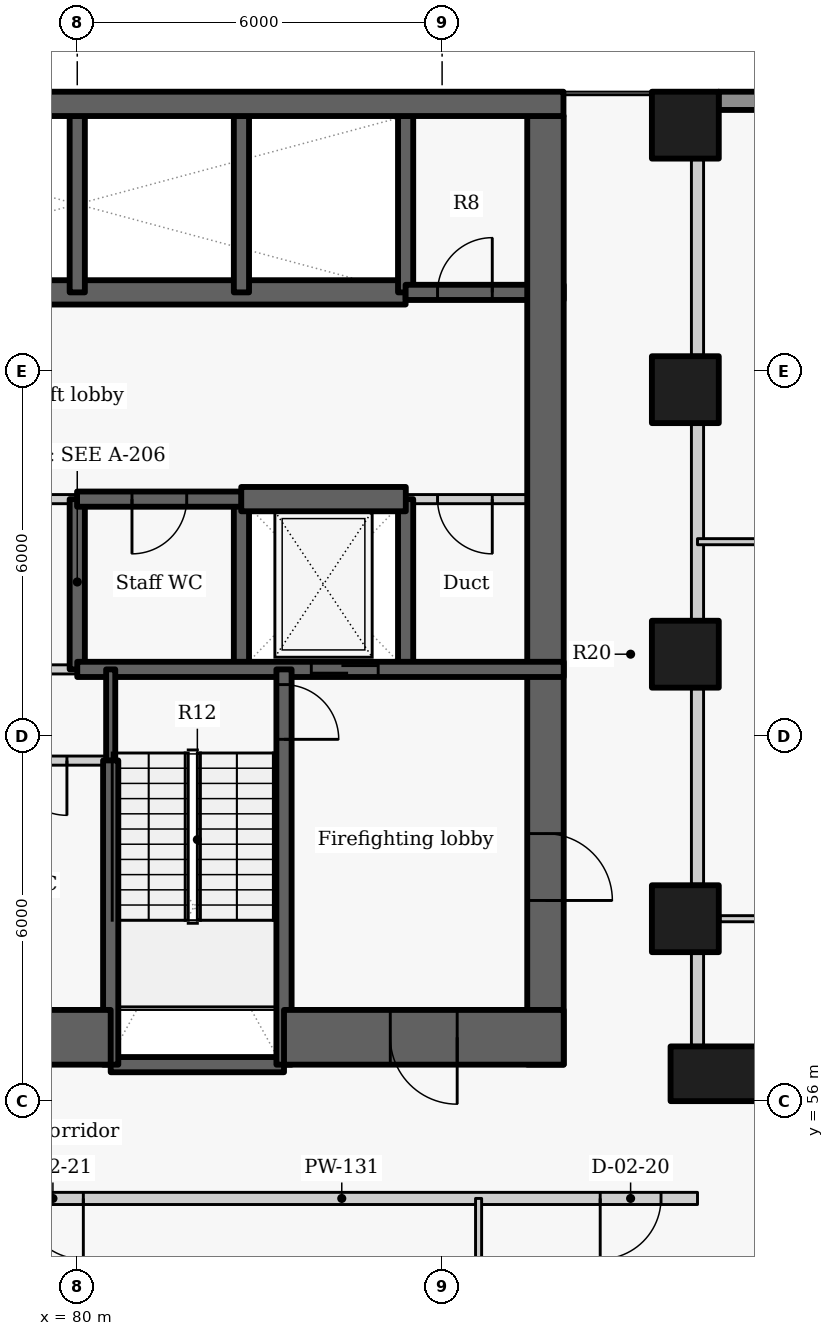
"""IFC4 building model, lengths in metres.
Left out: names, types, materials, properties, quantities, classifications, styles, units other than length and angle.
Written with IfcOpenShell. Run it as: python <this file> out.ifc"""

import sys

from ifc_helpers import new_model, si_unit, direction, frame, frame_2d, origin, origin_2d, place, context, subcontext, project, spatial, rectangle, extrude, element, fill, save


model = new_model("IFC4")
c1 = context("Model", 3, precision=1e-05, world=origin(), true_north=direction((0.0, 1.0)))
c2 = subcontext(c1, "Body", "Model", "MODEL_VIEW")
j1 = project(units=[si_unit("LENGTHUNIT", "METRE"), si_unit("PLANEANGLEUNIT", "RADIAN")], contexts=[c1])
p1 = place(None, origin())
s1 = spatial("IfcSite", under=j1, at=p1, CompositionType="ELEMENT")
p2 = place(p1, origin())
s2 = spatial("IfcBuilding", under=s1, at=p2, CompositionType="ELEMENT")
p3 = place(p2, frame((0.0, 0.0, 24.0)))
s3 = spatial("IfcBuildingStorey", under=s2, at=p3, CompositionType="ELEMENT", Elevation=24.0)
p4 = place(p3, frame((90.507, 56.45, 0.0), z_axis=(0.0, 0.0, 1.0), x_axis=(1.0, 0.0, 0.0)))
e1 = element("IfcColumn", 1, at=p4, inside=s3, PredefinedType="COLUMN", context=c2, shape_type="SweptSolid", body=[
    extrude(rectangle(XDim=1.5, YDim=0.9, at=origin_2d()), origin(), (0.0, 0.0, 1.0), 4.2),
])
for number, where, z_axis, x_axis in (
    (2, (90.0, 59.0, 0.0), (0.0, 0.0, 1.0), (0.0, 1.0, 0.0)),
    (3, (90.0, 63.35, 0.0), (0.0, 0.0, 1.0), (0.0, 1.0, 0.0)),
    (4, (90.0, 67.7, 0.0), (0.0, 0.0, 1.0), (0.0, 1.0, 0.0)),
    (5, (90.0, 72.05, 0.0), (0.0, 0.0, 1.0), (0.0, 1.0, 0.0)),
):
    element("IfcColumn", number, at=place(p3, frame(where, z_axis=z_axis, x_axis=x_axis)), inside=s3, PredefinedType="COLUMN", context=c2, shape_type="SweptSolid", body=[
        extrude(rectangle(XDim=1.1, YDim=1.1, at=origin_2d()), origin(), (0.0, 0.0, 1.0), 4.2),
    ])
p5 = place(p3, frame((96.562, 72.45, 0.0), z_axis=(0.0, 0.0, 1.0), x_axis=(-1.0, 0.0, 0.0)))
e6 = element("IfcWall", 6, at=p5, inside=s3, PredefinedType="SOLIDWALL", context=c2, shape_type="SweptSolid", body=[
    extrude(rectangle(XDim=6.016, YDim=0.3, at=frame_2d((3.008, 0.0))), origin(), (0.0, 0.0, 1.0), 3.325),
])
p6 = place(p5, frame((1.958, 0.0, 0.9)))
e7 = element("IfcOpeningElement", 7, at=p6, cuts=e6, PredefinedType="OPENING", context=c2, shape_type="SweptSolid", body=[
    extrude(rectangle(XDim=2.1, YDim=2.05, at=frame_2d((1.05, 1.025))), frame((0.0, 0.16, 0.0), z_axis=(0.0, -1.0, 0.0), x_axis=(1.0, 0.0, 0.0)), (0.0, 0.0, 1.0), 0.32),
])
p7 = place(p3, frame((74.6, 69.3, -0.3), z_axis=(0.0, 0.0, 1.0), x_axis=(1.0, 0.0, 0.0)))
e8 = element("IfcWall", 8, at=p7, inside=s3, PredefinedType="SHEAR", context=c2, shape_type="SweptSolid", body=[
    extrude(rectangle(XDim=10.8, YDim=0.4, at=frame_2d((5.4, 0.0))), origin(), (0.0, 0.0, 1.0), 4.225),
])
p8 = place(p3, frame((80.0, 63.1, -0.3), z_axis=(0.0, 0.0, 1.0), x_axis=(0.0, 1.0, 0.0)))
e9 = element("IfcWall", 9, at=p8, inside=s3, PredefinedType="SHEAR", context=c2, shape_type="SweptSolid", body=[
    extrude(rectangle(XDim=2.8, YDim=0.25, at=frame_2d((1.4, 0.0))), origin(), (0.0, 0.0, 1.0), 4.225),
])
p9 = place(p3, frame((80.0, 69.3, -0.3), z_axis=(0.0, 0.0, 1.0), x_axis=(0.0, 1.0, 0.0)))
e10 = element("IfcWall", 10, at=p9, inside=s3, PredefinedType="SHEAR", context=c2, shape_type="SweptSolid", body=[
    extrude(rectangle(XDim=2.9, YDim=0.25, at=frame_2d((1.45, 0.0))), origin(), (0.0, 0.0, 1.0), 4.225),
])
p10 = place(p3, frame((82.7, 63.1, -0.3), z_axis=(0.0, 0.0, 1.0), x_axis=(0.0, 1.0, 0.0)))
e11 = element("IfcWall", 11, at=p10, inside=s3, PredefinedType="SHEAR", context=c2, shape_type="SweptSolid", body=[
    extrude(rectangle(XDim=2.8, YDim=0.25, at=frame_2d((1.4, 0.0))), origin(), (0.0, 0.0, 1.0), 4.225),
])
p11 = place(p3, frame((82.7, 69.3, -0.3), z_axis=(0.0, 0.0, 1.0), x_axis=(0.0, 1.0, 0.0)))
e12 = element("IfcWall", 12, at=p11, inside=s3, PredefinedType="SHEAR", context=c2, shape_type="SweptSolid", body=[
    extrude(rectangle(XDim=2.9, YDim=0.25, at=frame_2d((1.45, 0.0))), origin(), (0.0, 0.0, 1.0), 4.225),
])
p12 = place(p3, frame((85.4, 63.1, -0.3), z_axis=(0.0, 0.0, 1.0), x_axis=(0.0, 1.0, 0.0)))
e13 = element("IfcWall", 13, at=p12, inside=s3, PredefinedType="SHEAR", context=c2, shape_type="SweptSolid", body=[
    extrude(rectangle(XDim=2.8, YDim=0.25, at=frame_2d((1.4, 0.0))), origin(), (0.0, 0.0, 1.0), 4.225),
])
p13 = place(p3, frame((85.4, 69.3, -0.3), z_axis=(0.0, 0.0, 1.0), x_axis=(0.0, 1.0, 0.0)))
e14 = element("IfcWall", 14, at=p13, inside=s3, PredefinedType="SHEAR", context=c2, shape_type="SweptSolid", body=[
    extrude(rectangle(XDim=2.9, YDim=0.25, at=frame_2d((1.45, 0.0))), origin(), (0.0, 0.0, 1.0), 4.225),
])
p14 = place(p3, frame((85.4, 69.3, -0.3), z_axis=(0.0, 0.0, 1.0), x_axis=(1.0, 0.0, 0.0)))
e15 = element("IfcWall", 15, at=p14, inside=s3, PredefinedType="SHEAR", context=c2, shape_type="SweptSolid", body=[
    extrude(rectangle(XDim=2.6, YDim=0.25, at=frame_2d((1.3, 0.0))), origin(), (0.0, 0.0, 1.0), 4.225),
])
p15 = place(p14, frame((0.525, 0.0, 0.3)))
e16 = element("IfcOpeningElement", 16, at=p15, cuts=e15, PredefinedType="OPENING", context=c2, shape_type="SweptSolid", body=[
    extrude(rectangle(XDim=0.9, YDim=2.1, at=frame_2d((0.45, 1.05))), frame((0.0, 0.135, 0.0), z_axis=(0.0, -1.0, 0.0), x_axis=(1.0, 0.0, 0.0)), (0.0, 0.0, 1.0), 0.27),
])
p16 = place(p3, frame((87.7, 72.2, -0.3), z_axis=(0.0, 0.0, 1.0), x_axis=(0.0, -1.0, 0.0)))
e17 = element("IfcWall", 17, at=p16, inside=s3, PredefinedType="SHEAR", context=c2, shape_type="SweptSolid", body=[
    extrude(rectangle(XDim=15.6, YDim=0.6, at=frame_2d((7.8, 0.0))), origin(), (0.0, 0.0, 1.0), 4.225),
])
p17 = place(p16, frame((11.8, 0.0, 0.3)))
e18 = element("IfcOpeningElement", 18, at=p17, cuts=e17, PredefinedType="OPENING", context=c2, shape_type="SweptSolid", body=[
    extrude(rectangle(XDim=1.1, YDim=2.1, at=frame_2d((0.55, 1.05))), frame((0.0, 0.31, 0.0), z_axis=(0.0, -1.0, 0.0), x_axis=(1.0, 0.0, 0.0)), (0.0, 0.0, 1.0), 0.62),
])
p18 = place(p3, frame((80.003, 65.9, 0.0), z_axis=(0.0, 0.0, 1.0), x_axis=(-1.0, 0.0, 0.0)))
e19 = element("IfcWall", 19, at=p18, inside=s3, PredefinedType="PARTITIONING", context=c2, shape_type="SweptSolid", body=[
    extrude(rectangle(XDim=2.706, YDim=0.15, at=frame_2d((1.353, 0.0))), origin(), (0.0, 0.0, 1.0), 3.925),
])
p19 = place(p18, frame((0.753, 0.0, 0.0)))
e20 = element("IfcOpeningElement", 20, at=p19, cuts=e19, PredefinedType="OPENING", context=c2, shape_type="SweptSolid", body=[
    extrude(rectangle(XDim=1.2, YDim=2.1, at=frame_2d((0.6, 1.05))), frame((0.0, 0.085, 0.0), z_axis=(0.0, -1.0, 0.0), x_axis=(1.0, 0.0, 0.0)), (0.0, 0.0, 1.0), 0.17),
])
p20 = place(p3, frame((88.0, 65.9, 0.0), z_axis=(0.0, 0.0, 1.0), x_axis=(-1.0, 0.0, 0.0)))
e21 = element("IfcWall", 21, at=p20, inside=s3, PredefinedType="PARTITIONING", context=c2, shape_type="SweptSolid", body=[
    extrude(rectangle(XDim=2.603, YDim=0.15, at=frame_2d((1.302, 0.0))), origin(), (0.0, 0.0, 1.0), 3.925),
])
p21 = place(p20, frame((1.175, 0.0, 0.0)))
e22 = element("IfcOpeningElement", 22, at=p21, cuts=e21, PredefinedType="OPENING", context=c2, shape_type="SweptSolid", body=[
    extrude(rectangle(XDim=0.9, YDim=2.1, at=frame_2d((0.45, 1.05))), frame((0.0, 0.085, 0.0), z_axis=(0.0, -1.0, 0.0), x_axis=(1.0, 0.0, 0.0)), (0.0, 0.0, 1.0), 0.17),
])
p22 = place(p3, frame((82.703, 65.9, -0.3), z_axis=(0.0, 0.0, 1.0), x_axis=(-1.0, 0.0, 0.0)))
e23 = element("IfcWall", 23, at=p22, inside=s3, PredefinedType="SHEAR", context=c2, shape_type="SweptSolid", body=[
    extrude(rectangle(XDim=2.706, YDim=0.25, at=frame_2d((1.353, 0.0))), origin(), (0.0, 0.0, 1.0), 4.225),
])
p23 = place(p22, frame((0.903, 0.0, 0.3)))
e24 = element("IfcOpeningElement", 24, at=p23, cuts=e23, PredefinedType="OPENING", context=c2, shape_type="SweptSolid", body=[
    extrude(rectangle(XDim=0.9, YDim=2.1, at=frame_2d((0.45, 1.05))), frame((0.0, 0.135, 0.0), z_axis=(0.0, -1.0, 0.0), x_axis=(1.0, 0.0, 0.0)), (0.0, 0.0, 1.0), 0.27),
])
p24 = place(p3, frame((82.697, 65.9, -0.3), z_axis=(0.0, 0.0, 1.0), x_axis=(1.0, 0.0, 0.0)))
e25 = element("IfcWall", 25, at=p24, inside=s3, PredefinedType="SHEAR", context=c2, shape_type="SweptSolid", body=[
    extrude(rectangle(XDim=2.706, YDim=0.4, at=frame_2d((1.353, 0.0))), origin(), (0.0, 0.0, 1.0), 4.225),
])
p25 = place(p3, frame((80.0, 63.1, -0.3), z_axis=(0.0, 0.0, 1.0), x_axis=(1.0, 0.0, 0.0)))
e26 = element("IfcWall", 26, at=p25, inside=s3, PredefinedType="SHEAR", context=c2, shape_type="SweptSolid", body=[
    extrude(rectangle(XDim=8.0, YDim=0.25, at=frame_2d((4.0, 0.0))), origin(), (0.0, 0.0, 1.0), 4.225),
])
p26 = place(p25, frame((3.849, 0.0, 0.3)))
e27 = element("IfcOpeningElement", 27, at=p26, cuts=e26, PredefinedType="OPENING", context=c2, shape_type="SweptSolid", body=[
    extrude(rectangle(XDim=1.1, YDim=2.1, at=frame_2d((0.55, 1.05))), frame((0.0, 0.135, 0.0), z_axis=(0.0, -1.0, 0.0), x_axis=(1.0, 0.0, 0.0)), (0.0, 0.0, 1.0), 0.27),
])
p27 = place(p3, frame((80.0, 63.1, 0.0), z_axis=(0.0, 0.0, 1.0), x_axis=(-1.0, 0.0, 0.0)))
e28 = element("IfcWall", 28, at=p27, inside=s3, PredefinedType="PARTITIONING", context=c2, shape_type="SweptSolid", body=[
    extrude(rectangle(XDim=2.7, YDim=0.15, at=frame_2d((1.35, 0.0))), origin(), (0.0, 0.0, 1.0), 3.925),
])
p28 = place(p27, frame((0.85, 0.0, 0.0)))
e29 = element("IfcOpeningElement", 29, at=p28, cuts=e28, PredefinedType="OPENING", context=c2, shape_type="SweptSolid", body=[
    extrude(rectangle(XDim=1.0, YDim=2.1, at=frame_2d((0.5, 1.05))), frame((0.0, 0.085, 0.0), z_axis=(0.0, -1.0, 0.0), x_axis=(1.0, 0.0, 0.0)), (0.0, 0.0, 1.0), 0.17),
])
p29 = place(p3, frame((80.55, 56.6, -0.3), z_axis=(0.0, 0.0, 1.0), x_axis=(1.0, 0.0, 0.0)))
e30 = element("IfcWall", 30, at=p29, inside=s3, PredefinedType="SHEAR", context=c2, shape_type="SweptSolid", body=[
    extrude(rectangle(XDim=2.85, YDim=0.25, at=frame_2d((1.425, 0.0))), origin(), (0.0, 0.0, 1.0), 4.225),
])
p30 = place(p3, frame((83.4, 63.1, -0.3), z_axis=(0.0, 0.0, 1.0), x_axis=(0.0, -1.0, 0.0)))
e31 = element("IfcWall", 31, at=p30, inside=s3, PredefinedType="SHEAR", context=c2, shape_type="SweptSolid", body=[
    extrude(rectangle(XDim=6.5, YDim=0.25, at=frame_2d((3.25, 0.0))), origin(), (0.0, 0.0, 1.0), 4.225),
])
p31 = place(p30, frame((0.25, 0.0, 0.3)))
e32 = element("IfcOpeningElement", 32, at=p31, cuts=e31, PredefinedType="OPENING", context=c2, shape_type="SweptSolid", body=[
    extrude(rectangle(XDim=0.9, YDim=2.1, at=frame_2d((0.45, 1.05))), frame((0.0, 0.135, 0.0), z_axis=(0.0, -1.0, 0.0), x_axis=(1.0, 0.0, 0.0)), (0.0, 0.0, 1.0), 0.27),
])
p32 = place(p3, frame((80.55, 61.597, -0.3), z_axis=(0.0, 0.0, 1.0), x_axis=(0.0, 1.0, 0.0)))
e33 = element("IfcWall", 33, at=p32, inside=s3, PredefinedType="SHEAR", context=c2, shape_type="SweptSolid", body=[
    extrude(rectangle(XDim=1.503, YDim=0.15, at=frame_2d((0.751, 0.0))), origin(), (0.0, 0.0, 1.0), 4.225),
])
p33 = place(p3, frame((80.55, 56.6, -0.3), z_axis=(0.0, 0.0, 1.0), x_axis=(0.0, 1.0, 0.0)))
e34 = element("IfcWall", 34, at=p33, inside=s3, PredefinedType="SHEAR", context=c2, shape_type="SweptSolid", body=[
    extrude(rectangle(XDim=5.003, YDim=0.25, at=frame_2d((2.501, 0.0))), origin(), (0.0, 0.0, 1.0), 4.225),
])
p34 = place(p3, frame((75.35, 57.05, -0.3), z_axis=(0.0, 0.0, 1.0), x_axis=(1.0, 0.0, 0.0)))
e35 = element("IfcWall", 35, at=p34, inside=s3, PredefinedType="SHEAR", context=c2, shape_type="SweptSolid", body=[
    extrude(rectangle(XDim=5.2, YDim=0.9, at=frame_2d((2.6, 0.0))), origin(), (0.0, 0.0, 1.0), 4.225),
])
p35 = place(p3, frame((88.0, 57.05, -0.3), z_axis=(0.0, 0.0, 1.0), x_axis=(-1.0, 0.0, 0.0)))
e36 = element("IfcWall", 36, at=p35, inside=s3, PredefinedType="SHEAR", context=c2, shape_type="SweptSolid", body=[
    extrude(rectangle(XDim=4.6, YDim=0.9, at=frame_2d((2.3, 0.0))), origin(), (0.0, 0.0, 1.0), 4.225),
])
p36 = place(p35, frame((1.752, 0.0, 0.3)))
e37 = element("IfcOpeningElement", 37, at=p36, cuts=e36, PredefinedType="OPENING", context=c2, shape_type="SweptSolid", body=[
    extrude(rectangle(XDim=1.1, YDim=2.1, at=frame_2d((0.55, 1.05))), frame((0.0, 0.46, 0.0), z_axis=(0.0, -1.0, 0.0), x_axis=(1.0, 0.0, 0.0)), (0.0, 0.0, 1.0), 0.92),
])
p37 = place(p3, frame((80.55, 61.6, 0.0), z_axis=(0.0, 0.0, 1.0), x_axis=(-1.0, 0.0, 0.0)))
e38 = element("IfcWall", 38, at=p37, inside=s3, PredefinedType="PARTITIONING", context=c2, shape_type="SweptSolid", body=[
    extrude(rectangle(XDim=5.2, YDim=0.15, at=frame_2d((2.6, 0.0))), origin(), (0.0, 0.0, 1.0), 3.925),
])
p38 = place(p37, frame((4.1, 0.0, 0.0)))
e39 = element("IfcOpeningElement", 39, at=p38, cuts=e38, PredefinedType="OPENING", context=c2, shape_type="SweptSolid", body=[
    extrude(rectangle(XDim=0.9, YDim=2.1, at=frame_2d((0.45, 1.05))), frame((0.0, 0.085, 0.0), z_axis=(0.0, -1.0, 0.0), x_axis=(1.0, 0.0, 0.0)), (0.0, 0.0, 1.0), 0.17),
])
p39 = place(p37, frame((2.67, 0.0, 0.0)))
e40 = element("IfcOpeningElement", 40, at=p39, cuts=e38, PredefinedType="OPENING", context=c2, shape_type="SweptSolid", body=[
    extrude(rectangle(XDim=0.9, YDim=2.1, at=frame_2d((0.45, 1.05))), frame((0.0, 0.085, 0.0), z_axis=(0.0, -1.0, 0.0), x_axis=(1.0, 0.0, 0.0)), (0.0, 0.0, 1.0), 0.17),
])
p40 = place(p37, frame((0.72, 0.0, 0.0)))
e41 = element("IfcOpeningElement", 41, at=p40, cuts=e38, PredefinedType="OPENING", context=c2, shape_type="SweptSolid", body=[
    extrude(rectangle(XDim=0.9, YDim=2.1, at=frame_2d((0.45, 1.05))), frame((0.0, 0.085, 0.0), z_axis=(0.0, -1.0, 0.0), x_axis=(1.0, 0.0, 0.0)), (0.0, 0.0, 1.0), 0.17),
])
p41 = place(p3, frame((90.2, 56.917, 0.0), z_axis=(0.0, 0.0, 1.0), x_axis=(0.0, 1.0, 0.0)))
e42 = element("IfcWall", 42, at=p41, inside=s3, PredefinedType="PARTITIONING", context=c2, shape_type="SweptSolid", body=[
    extrude(rectangle(XDim=1.516, YDim=0.2, at=frame_2d((0.758, 0.0))), origin(), (0.0, 0.0, 1.0), 3.925),
])
for number, where, z_axis, x_axis in (
    (43, (90.2, 59.567, 0.0), (0.0, 0.0, 1.0), (0.0, 1.0, 0.0)),
    (44, (90.2, 63.917, 0.0), (0.0, 0.0, 1.0), (0.0, 1.0, 0.0)),
):
    element("IfcWall", number, at=place(p3, frame(where, z_axis=z_axis, x_axis=x_axis)), inside=s3, PredefinedType="PARTITIONING", context=c2, shape_type="SweptSolid", body=[
        extrude(rectangle(XDim=3.216, YDim=0.2, at=frame_2d((1.608, 0.0))), origin(), (0.0, 0.0, 1.0), 3.405),
    ])
p42 = place(p3, frame((90.2, 68.267, 0.0), z_axis=(0.0, 0.0, 1.0), x_axis=(0.0, 1.0, 0.0)))
e45 = element("IfcWall", 45, at=p42, inside=s3, PredefinedType="PARTITIONING", context=c2, shape_type="SweptSolid", body=[
    extrude(rectangle(XDim=3.216, YDim=0.2, at=frame_2d((1.608, 0.0))), origin(), (0.0, 0.0, 1.0), 3.405),
])
p43 = place(p3, frame((90.2, 54.4, 0.0), z_axis=(0.0, 0.0, 1.0), x_axis=(-1.0, 0.0, 0.0)))
e46 = element("IfcWall", 46, at=p43, inside=s3, PredefinedType="PARTITIONING", context=c2, shape_type="SweptSolid", body=[
    extrude(rectangle(XDim=20.4, YDim=0.2, at=frame_2d((10.2, 0.0))), origin(), (0.0, 0.0, 1.0), 3.925),
])
p44 = place(p43, frame((18.8, 0.0, 0.0)))
e47 = element("IfcOpeningElement", 47, at=p44, cuts=e46, PredefinedType="OPENING", context=c2, shape_type="SweptSolid", body=[
    extrude(rectangle(XDim=1.0, YDim=2.1, at=frame_2d((0.5, 1.05))), frame((0.0, 0.11, 0.0), z_axis=(0.0, -1.0, 0.0), x_axis=(1.0, 0.0, 0.0)), (0.0, 0.0, 1.0), 0.22),
])
p45 = place(p43, frame((0.6, 0.0, 0.0)))
e48 = element("IfcOpeningElement", 48, at=p45, cuts=e46, PredefinedType="OPENING", context=c2, shape_type="SweptSolid", body=[
    extrude(rectangle(XDim=1.0, YDim=2.1, at=frame_2d((0.5, 1.05))), frame((0.0, 0.11, 0.0), z_axis=(0.0, -1.0, 0.0), x_axis=(1.0, 0.0, 0.0)), (0.0, 0.0, 1.0), 0.22),
])
p46 = place(p43, frame((10.1, 0.0, 0.0)))
e49 = element("IfcOpeningElement", 49, at=p46, cuts=e46, PredefinedType="OPENING", context=c2, shape_type="SweptSolid", body=[
    extrude(rectangle(XDim=1.0, YDim=2.1, at=frame_2d((0.5, 1.05))), frame((0.0, 0.11, 0.0), z_axis=(0.0, -1.0, 0.0), x_axis=(1.0, 0.0, 0.0)), (0.0, 0.0, 1.0), 0.22),
])
p47 = place(p3, frame((90.2, 65.2, 0.0), z_axis=(0.0, 0.0, 1.0), x_axis=(1.0, 0.0, 0.0)))
e50 = element("IfcWall", 50, at=p47, inside=s3, PredefinedType="PARTITIONING", context=c2, shape_type="SweptSolid", body=[
    extrude(rectangle(XDim=7.366, YDim=0.1, at=frame_2d((3.683, 0.0))), origin(), (0.0, 0.0, 1.0), 3.925),
])
p48 = place(p3, frame((90.57, 59.0, 0.0), z_axis=(0.0, 0.0, 1.0), x_axis=(1.0, 0.0, 0.0)))
e51 = element("IfcWall", 51, at=p48, inside=s3, PredefinedType="PARTITIONING", context=c2, shape_type="SweptSolid", body=[
    extrude(rectangle(XDim=3.956, YDim=0.1, at=frame_2d((1.978, 0.0))), origin(), (0.0, 0.0, 1.0), 3.925),
])
p49 = place(p3, frame((86.6, 47.3, 0.0), z_axis=(0.0, 0.0, 1.0), x_axis=(0.0, 1.0, 0.0)))
e52 = element("IfcWall", 52, at=p49, inside=s3, PredefinedType="PARTITIONING", context=c2, shape_type="SweptSolid", body=[
    extrude(rectangle(XDim=7.1, YDim=0.1, at=frame_2d((3.55, 0.0))), origin(), (0.0, 0.0, 1.0), 3.925),
])
p50 = place(p3, frame((72.004, 72.4, -0.3), z_axis=(0.0, 0.0, 1.0), x_axis=(1.0, 0.0, 0.0)))
e53 = element("IfcWall", 53, at=p50, inside=s3, PredefinedType="SHEAR", context=c2, shape_type="SweptSolid", body=[
    extrude(rectangle(XDim=15.992, YDim=0.4, at=frame_2d((7.996, 0.0))), origin(), (0.0, 0.0, 1.0), 4.225),
])
p51 = place(p15, origin())
e54 = element("IfcDoor", 54, at=p51, inside=s3, OperationType="SINGLE_SWING_RIGHT", PredefinedType="DOOR", context=c2, shape_type="SweptSolid", body=[
    extrude(rectangle(XDim=0.9, YDim=2.1, at=frame_2d((0.45, 1.05))), frame((0.0, 0.025, 0.0), z_axis=(0.0, -1.0, 0.0), x_axis=(1.0, 0.0, 0.0)), (0.0, 0.0, 1.0), 0.05),
])
fill(e16, e54)
p52 = place(p23, origin())
e55 = element("IfcDoor", 55, at=p52, inside=s3, OperationType="SINGLE_SWING_RIGHT", PredefinedType="DOOR", context=c2, shape_type="SweptSolid", body=[
    extrude(rectangle(XDim=0.9, YDim=2.1, at=frame_2d((0.45, 1.05))), frame((0.0, 0.025, 0.0), z_axis=(0.0, -1.0, 0.0), x_axis=(1.0, 0.0, 0.0)), (0.0, 0.0, 1.0), 0.05),
])
fill(e24, e55)
p53 = place(p26, origin())
e56 = element("IfcDoor", 56, at=p53, inside=s3, OperationType="SLIDING_TO_LEFT", PredefinedType="DOOR", context=c2, shape_type="SweptSolid", body=[
    extrude(rectangle(XDim=1.1, YDim=2.1, at=frame_2d((0.55, 1.05))), frame((0.0, 0.025, 0.0), z_axis=(0.0, -1.0, 0.0), x_axis=(1.0, 0.0, 0.0)), (0.0, 0.0, 1.0), 0.05),
])
fill(e27, e56)
p54 = place(p21, origin())
e57 = element("IfcDoor", 57, at=p54, inside=s3, OperationType="SINGLE_SWING_LEFT", PredefinedType="DOOR", context=c2, shape_type="SweptSolid", body=[
    extrude(rectangle(XDim=0.9, YDim=2.1, at=frame_2d((0.45, 1.05))), frame((0.0, 0.025, 0.0), z_axis=(0.0, -1.0, 0.0), x_axis=(1.0, 0.0, 0.0)), (0.0, 0.0, 1.0), 0.05),
])
fill(e22, e57)
p55 = place(p40, origin())
e58 = element("IfcDoor", 58, at=p55, inside=s3, OperationType="SINGLE_SWING_LEFT", PredefinedType="DOOR", context=c2, shape_type="SweptSolid", body=[
    extrude(rectangle(XDim=0.9, YDim=2.1, at=frame_2d((0.45, 1.05))), frame((0.0, 0.025, 0.0), z_axis=(0.0, -1.0, 0.0), x_axis=(1.0, 0.0, 0.0)), (0.0, 0.0, 1.0), 0.05),
])
fill(e41, e58)
p56 = place(p31, origin())
e59 = element("IfcDoor", 59, at=p56, inside=s3, OperationType="SINGLE_SWING_RIGHT", PredefinedType="DOOR", context=c2, shape_type="SweptSolid", body=[
    extrude(rectangle(XDim=0.9, YDim=2.1, at=frame_2d((0.45, 1.05))), frame((0.0, 0.025, 0.0), z_axis=(0.0, -1.0, 0.0), x_axis=(1.0, 0.0, 0.0)), (0.0, 0.0, 1.0), 0.05),
])
fill(e32, e59)
p57 = place(p45, origin())
e60 = element("IfcDoor", 60, at=p57, inside=s3, OperationType="SINGLE_SWING_RIGHT", PredefinedType="DOOR", context=c2, shape_type="SweptSolid", body=[
    extrude(rectangle(XDim=1.0, YDim=2.1, at=frame_2d((0.5, 1.05))), frame((0.0, 0.025, 0.0), z_axis=(0.0, -1.0, 0.0), x_axis=(1.0, 0.0, 0.0)), (0.0, 0.0, 1.0), 0.05),
])
fill(e48, e60)
p58 = place(p46, origin())
e61 = element("IfcDoor", 61, at=p58, inside=s3, OperationType="SINGLE_SWING_LEFT", PredefinedType="DOOR", context=c2, shape_type="SweptSolid", body=[
    extrude(rectangle(XDim=1.0, YDim=2.1, at=frame_2d((0.5, 1.05))), frame((0.0, 0.025, 0.0), z_axis=(0.0, -1.0, 0.0), x_axis=(1.0, 0.0, 0.0)), (0.0, 0.0, 1.0), 0.05),
])
fill(e49, e61)
p59 = place(p17, origin())
e62 = element("IfcDoor", 62, at=p59, inside=s3, OperationType="SINGLE_SWING_RIGHT", PredefinedType="DOOR", context=c2, shape_type="SweptSolid", body=[
    extrude(rectangle(XDim=1.1, YDim=2.1, at=frame_2d((0.55, 1.05))), frame((0.0, 0.025, 0.0), z_axis=(0.0, -1.0, 0.0), x_axis=(1.0, 0.0, 0.0)), (0.0, 0.0, 1.0), 0.05),
])
fill(e18, e62)
p60 = place(p36, origin())
e63 = element("IfcDoor", 63, at=p60, inside=s3, OperationType="SINGLE_SWING_LEFT", PredefinedType="DOOR", context=c2, shape_type="SweptSolid", body=[
    extrude(rectangle(XDim=1.1, YDim=2.1, at=frame_2d((0.55, 1.05))), frame((0.0, 0.025, 0.0), z_axis=(0.0, -1.0, 0.0), x_axis=(1.0, 0.0, 0.0)), (0.0, 0.0, 1.0), 0.05),
])
fill(e37, e63)
save(model, sys.argv[1])
